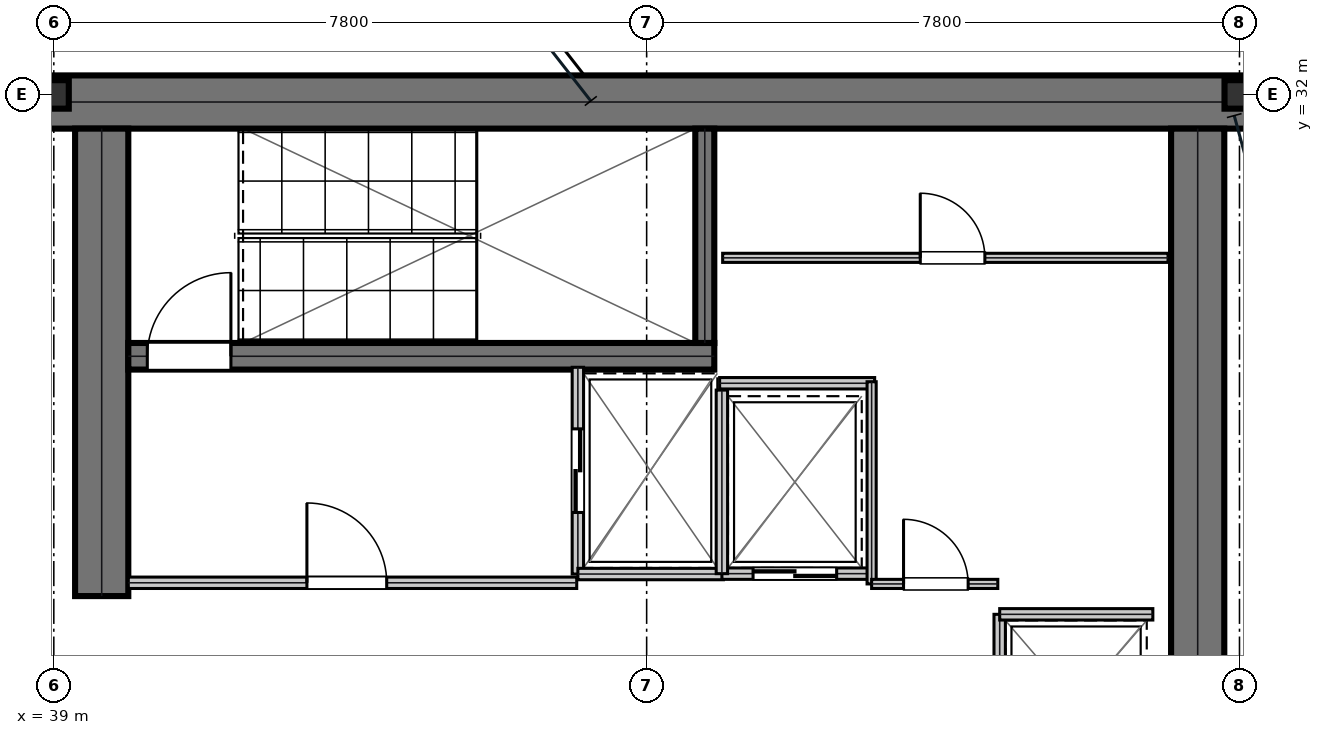
"""IFC4 building model, lengths in metres.
Left out: names, types, materials, properties, quantities, classifications, styles, units other than length and angle.
Written with IfcOpenShell. Run it as: python <this file> out.ifc"""

import sys

from ifc_helpers import new_model, si_unit, direction, frame, frame_2d, origin, origin_2d, place, context, subcontext, project, spatial, rectangle, i_section, extrude, element, fill, save


model = new_model("IFC4")
c1 = context("Model", 3, precision=1e-05, world=origin(), true_north=direction((0.0, 1.0)))
c2 = subcontext(c1, "Body", "Model", "MODEL_VIEW")
j1 = project(units=[si_unit("LENGTHUNIT", "METRE"), si_unit("PLANEANGLEUNIT", "RADIAN")], contexts=[c1])
p1 = place(None, origin())
s1 = spatial("IfcSite", under=j1, at=p1, CompositionType="ELEMENT")
p2 = place(p1, origin())
s2 = spatial("IfcBuilding", under=s1, at=p2, CompositionType="ELEMENT")
p3 = place(p2, frame((0.0, 0.0, 244.5)))
s3 = spatial("IfcBuildingStorey", under=s2, at=p3, CompositionType="ELEMENT", Elevation=244.5)
p4 = place(p3, frame((38.8, 31.9, 0.0), z_axis=(0.0, 0.0, 1.0), x_axis=(1.0, 0.0, 0.0)))
e1 = element("IfcWall", 1, at=p4, inside=s3, PredefinedType="SHEAR", context=c2, shape_type="SweptSolid", body=[
    extrude(rectangle(XDim=16.0, YDim=0.7, at=frame_2d((8.0, 0.0))), origin(), (0.0, 0.0, 1.0), 3.79),
])
p5 = place(p3, frame((39.63, 25.4, 0.0), z_axis=(0.0, 0.0, 1.0), x_axis=(0.0, 1.0, 0.0)))
e2 = element("IfcWall", 2, at=p5, inside=s3, PredefinedType="SHEAR", context=c2, shape_type="SweptSolid", body=[
    extrude(rectangle(XDim=6.15, YDim=0.7, at=frame_2d((3.075, 0.0))), origin(), (0.0, 0.0, 1.0), 3.79),
])
p6 = place(p3, frame((54.05, 16.45, 0.0), z_axis=(0.0, 0.0, 1.0), x_axis=(0.0, 1.0, 0.0)))
e3 = element("IfcWall", 3, at=p6, inside=s3, PredefinedType="SHEAR", context=c2, shape_type="SweptSolid", body=[
    extrude(rectangle(XDim=15.1, YDim=0.7, at=frame_2d((7.55, 0.0))), origin(), (0.0, 0.0, 1.0), 3.79),
])
p7 = place(p3, frame((39.98, 28.555, 0.0), z_axis=(0.0, 0.0, 1.0), x_axis=(1.0, 0.0, 0.0)))
e4 = element("IfcWall", 4, at=p7, inside=s3, PredefinedType="SHEAR", context=c2, shape_type="SweptSolid", body=[
    extrude(rectangle(XDim=7.71, YDim=0.35, at=frame_2d((3.855, 0.0))), origin(), (0.0, 0.0, 1.0), 3.79),
])
p8 = place(p7, frame((0.25, 0.0, 0.0)))
e5 = element("IfcOpeningElement", 5, at=p8, cuts=e4, PredefinedType="OPENING", context=c2, shape_type="SweptSolid", body=[
    extrude(rectangle(XDim=1.1, YDim=2.15, at=frame_2d((0.55, 1.075))), frame((0.0, 0.185, 0.0), z_axis=(0.0, -1.0, 0.0), x_axis=(1.0, 0.0, 0.0)), (0.0, 0.0, 1.0), 0.37),
])
p9 = place(p3, frame((47.565, 28.73, 0.0), z_axis=(0.0, 0.0, 1.0), x_axis=(0.0, 1.0, 0.0)))
e6 = element("IfcWall", 6, at=p9, inside=s3, PredefinedType="SHEAR", context=c2, shape_type="SweptSolid", body=[
    extrude(rectangle(XDim=2.82, YDim=0.25, at=frame_2d((1.41, 0.0))), origin(), (0.0, 0.0, 1.0), 3.79),
])
for number, where, z_axis, x_axis in (
    (7, (39.0, 32.0, 0.0), (0.0, 0.0, 1.0), (1.0, 0.0, 0.0)),
    (8, (54.6, 32.0, 0.0), (0.0, 0.0, 1.0), (1.0, 0.0, 0.0)),
):
    element("IfcColumn", number, at=place(p3, frame(where, z_axis=z_axis, x_axis=x_axis)), inside=s3, PredefinedType="COLUMN", context=c2, shape_type="SweptSolid", body=[
        extrude(i_section(OverallWidth=0.394, OverallDepth=0.375, WebThickness=0.017, FlangeThickness=0.028, at=origin_2d()), origin(), (0.0, 0.0, 1.0), 4.044),
    ])
p10 = place(p3, frame((39.98, 25.575, 0.0), z_axis=(0.0, 0.0, 1.0), x_axis=(1.0, 0.0, 0.0)))
e9 = element("IfcWall", 9, at=p10, inside=s3, PredefinedType="PARTITIONING", context=c2, shape_type="SweptSolid", body=[
    extrude(rectangle(XDim=5.9, YDim=0.15, at=frame_2d((2.95, 0.0))), origin(), (0.0, 0.0, 1.0), 3.79),
])
p11 = place(p10, frame((2.35, 0.0, 0.0)))
e10 = element("IfcOpeningElement", 10, at=p11, cuts=e9, PredefinedType="OPENING", context=c2, shape_type="SweptSolid", body=[
    extrude(rectangle(XDim=1.05, YDim=2.15, at=frame_2d((0.525, 1.075))), frame((0.0, 0.085, 0.0), z_axis=(0.0, -1.0, 0.0), x_axis=(1.0, 0.0, 0.0)), (0.0, 0.0, 1.0), 0.17),
])
p12 = place(p3, frame((45.895, 25.69, 0.0), z_axis=(0.0, 0.0, 1.0), x_axis=(0.0, 1.0, 0.0)))
e11 = element("IfcWall", 11, at=p12, inside=s3, PredefinedType="PARTITIONING", context=c2, shape_type="SweptSolid", body=[
    extrude(rectangle(XDim=2.72, YDim=0.15, at=frame_2d((1.36, 0.0))), origin(), (0.0, 0.0, 1.0), 3.79),
])
p13 = place(p12, frame((0.81, 0.0, 0.0)))
e12 = element("IfcOpeningElement", 12, at=p13, cuts=e11, PredefinedType="OPENING", context=c2, shape_type="SweptSolid", body=[
    extrude(rectangle(XDim=1.1, YDim=2.15, at=frame_2d((0.55, 1.075))), frame((0.0, 0.085, 0.0), z_axis=(0.0, -1.0, 0.0), x_axis=(1.0, 0.0, 0.0)), (0.0, 0.0, 1.0), 0.17),
])
p14 = place(p3, frame((45.895, 25.69, 0.0), z_axis=(0.0, 0.0, 1.0), x_axis=(1.0, 0.0, 0.0)))
e13 = element("IfcWall", 13, at=p14, inside=s3, PredefinedType="PARTITIONING", context=c2, shape_type="SweptSolid", body=[
    extrude(rectangle(XDim=1.915, YDim=0.15, at=frame_2d((0.958, 0.0))), origin(), (0.0, 0.0, 1.0), 3.79),
])
p15 = place(p3, frame((47.79, 25.695, 0.0), z_axis=(0.0, 0.0, 1.0), x_axis=(1.0, 0.0, 0.0)))
e14 = element("IfcWall", 14, at=p15, inside=s3, PredefinedType="PARTITIONING", context=c2, shape_type="SweptSolid", body=[
    extrude(rectangle(XDim=1.92, YDim=0.15, at=frame_2d((0.96, 0.0))), origin(), (0.0, 0.0, 1.0), 3.79),
])
p16 = place(p15, frame((0.41, 0.0, 0.0)))
e15 = element("IfcOpeningElement", 15, at=p16, cuts=e14, PredefinedType="OPENING", context=c2, shape_type="SweptSolid", body=[
    extrude(rectangle(XDim=1.1, YDim=2.15, at=frame_2d((0.55, 1.075))), frame((0.0, 0.085, 0.0), z_axis=(0.0, -1.0, 0.0), x_axis=(1.0, 0.0, 0.0)), (0.0, 0.0, 1.0), 0.17),
])
p17 = place(p3, frame((47.79, 25.695, 0.0), z_axis=(0.0, 0.0, 1.0), x_axis=(0.0, 1.0, 0.0)))
e16 = element("IfcWall", 16, at=p17, inside=s3, PredefinedType="PARTITIONING", context=c2, shape_type="SweptSolid", body=[
    extrude(rectangle(XDim=2.415, YDim=0.15, at=frame_2d((1.208, 0.0))), origin(), (0.0, 0.0, 1.0), 3.79),
])
p18 = place(p3, frame((51.445, 22.84, 0.0), z_axis=(0.0, 0.0, 1.0), x_axis=(0.0, 1.0, 0.0)))
e17 = element("IfcWall", 17, at=p18, inside=s3, PredefinedType="PARTITIONING", context=c2, shape_type="SweptSolid", body=[
    extrude(rectangle(XDim=2.32, YDim=0.15, at=frame_2d((1.16, 0.0))), origin(), (0.0, 0.0, 1.0), 3.79),
])
p19 = place(p18, frame((0.61, 0.0, 0.0)))
e18 = element("IfcOpeningElement", 18, at=p19, cuts=e17, PredefinedType="OPENING", context=c2, shape_type="SweptSolid", body=[
    extrude(rectangle(XDim=1.1, YDim=2.15, at=frame_2d((0.55, 1.075))), frame((0.0, 0.085, 0.0), z_axis=(0.0, -1.0, 0.0), x_axis=(1.0, 0.0, 0.0)), (0.0, 0.0, 1.0), 0.17),
])
p20 = place(p3, frame((51.445, 25.16, 0.0), z_axis=(0.0, 0.0, 1.0), x_axis=(1.0, 0.0, 0.0)))
e19 = element("IfcWall", 19, at=p20, inside=s3, PredefinedType="PARTITIONING", context=c2, shape_type="SweptSolid", body=[
    extrude(rectangle(XDim=2.015, YDim=0.15, at=frame_2d((1.007, 0.0))), origin(), (0.0, 0.0, 1.0), 3.79),
])
p21 = place(p3, frame((47.76, 28.2, 0.0), z_axis=(0.0, 0.0, 1.0), x_axis=(1.0, 0.0, 0.0)))
e20 = element("IfcWall", 20, at=p21, inside=s3, PredefinedType="PARTITIONING", context=c2, shape_type="SweptSolid", body=[
    extrude(rectangle(XDim=2.04, YDim=0.15, at=frame_2d((1.02, 0.0))), origin(), (0.0, 0.0, 1.0), 3.79),
])
p22 = place(p3, frame((49.76, 25.56, 0.0), z_axis=(0.0, 0.0, 1.0), x_axis=(0.0, 1.0, 0.0)))
e21 = element("IfcWall", 21, at=p22, inside=s3, PredefinedType="PARTITIONING", context=c2, shape_type="SweptSolid", body=[
    extrude(rectangle(XDim=2.66, YDim=0.12, at=frame_2d((1.33, 0.0))), origin(), (0.0, 0.0, 1.0), 3.79),
])
p23 = place(p3, frame((49.76, 25.56, 0.0), z_axis=(0.0, 0.0, 1.0), x_axis=(1.0, 0.0, 0.0)))
e22 = element("IfcWall", 22, at=p23, inside=s3, PredefinedType="PARTITIONING", context=c2, shape_type="SweptSolid", body=[
    extrude(rectangle(XDim=1.66, YDim=0.12, at=frame_2d((0.83, 0.0))), origin(), (0.0, 0.0, 1.0), 3.79),
])
p24 = place(p23, frame((0.42, 0.0, 0.0)))
e23 = element("IfcOpeningElement", 23, at=p24, cuts=e22, PredefinedType="OPENING", context=c2, shape_type="SweptSolid", body=[
    extrude(rectangle(XDim=0.85, YDim=2.15, at=frame_2d((0.425, 1.075))), frame((0.0, 0.07, 0.0), z_axis=(0.0, -1.0, 0.0), x_axis=(1.0, 0.0, 0.0)), (0.0, 0.0, 1.0), 0.14),
])
p25 = place(p3, frame((47.8, 29.85, 0.0), z_axis=(0.0, 0.0, 1.0), x_axis=(1.0, 0.0, 0.0)))
e24 = element("IfcWall", 24, at=p25, inside=s3, PredefinedType="PARTITIONING", context=c2, shape_type="SweptSolid", body=[
    extrude(rectangle(XDim=5.86, YDim=0.12, at=frame_2d((2.93, 0.0))), origin(), (0.0, 0.0, 1.0), 3.79),
])
p26 = place(p25, frame((2.6, 0.0, 0.0)))
e25 = element("IfcOpeningElement", 25, at=p26, cuts=e24, PredefinedType="OPENING", context=c2, shape_type="SweptSolid", body=[
    extrude(rectangle(XDim=0.85, YDim=2.15, at=frame_2d((0.425, 1.075))), frame((0.0, 0.07, 0.0), z_axis=(0.0, -1.0, 0.0), x_axis=(1.0, 0.0, 0.0)), (0.0, 0.0, 1.0), 0.14),
])
p27 = place(p11, origin())
e26 = element("IfcDoor", 26, at=p27, inside=s3, OperationType="SINGLE_SWING_LEFT", PredefinedType="DOOR", context=c2, shape_type="SweptSolid", body=[
    extrude(rectangle(XDim=1.05, YDim=2.15, at=frame_2d((0.525, 1.075))), frame((0.0, 0.025, 0.0), z_axis=(0.0, -1.0, 0.0), x_axis=(1.0, 0.0, 0.0)), (0.0, 0.0, 1.0), 0.05),
])
fill(e10, e26)
p28 = place(p13, frame((1.1, 0.0, 0.0), z_axis=(0.0, 0.0, 1.0), x_axis=(-1.0, 0.0, 0.0)))
e27 = element("IfcDoor", 27, at=p28, inside=s3, OperationType="DOUBLE_DOOR_SLIDING", PredefinedType="DOOR", context=c2, shape_type="SweptSolid", body=[
    extrude(rectangle(XDim=1.1, YDim=2.15, at=frame_2d((0.55, 1.075))), frame((0.0, 0.025, 0.0), z_axis=(0.0, -1.0, 0.0), x_axis=(1.0, 0.0, 0.0)), (0.0, 0.0, 1.0), 0.05),
])
fill(e12, e27)
p29 = place(p16, frame((1.1, 0.0, 0.0), z_axis=(0.0, 0.0, 1.0), x_axis=(-1.0, 0.0, 0.0)))
e28 = element("IfcDoor", 28, at=p29, inside=s3, OperationType="DOUBLE_DOOR_SLIDING", PredefinedType="DOOR", context=c2, shape_type="SweptSolid", body=[
    extrude(rectangle(XDim=1.1, YDim=2.15, at=frame_2d((0.55, 1.075))), frame((0.0, 0.025, 0.0), z_axis=(0.0, -1.0, 0.0), x_axis=(1.0, 0.0, 0.0)), (0.0, 0.0, 1.0), 0.05),
])
fill(e15, e28)
p30 = place(p24, origin())
e29 = element("IfcDoor", 29, at=p30, inside=s3, OperationType="SINGLE_SWING_LEFT", PredefinedType="DOOR", context=c2, shape_type="SweptSolid", body=[
    extrude(rectangle(XDim=0.85, YDim=2.15, at=frame_2d((0.425, 1.075))), frame((0.0, 0.025, 0.0), z_axis=(0.0, -1.0, 0.0), x_axis=(1.0, 0.0, 0.0)), (0.0, 0.0, 1.0), 0.05),
])
fill(e23, e29)
p31 = place(p26, origin())
e30 = element("IfcDoor", 30, at=p31, inside=s3, OperationType="SINGLE_SWING_LEFT", PredefinedType="DOOR", context=c2, shape_type="SweptSolid", body=[
    extrude(rectangle(XDim=0.85, YDim=2.15, at=frame_2d((0.425, 1.075))), frame((0.0, 0.025, 0.0), z_axis=(0.0, -1.0, 0.0), x_axis=(1.0, 0.0, 0.0)), (0.0, 0.0, 1.0), 0.05),
])
fill(e25, e30)
p32 = place(p8, origin())
e31 = element("IfcDoor", 31, at=p32, inside=s3, OperationType="SINGLE_SWING_RIGHT", PredefinedType="DOOR", context=c2, shape_type="SweptSolid", body=[
    extrude(rectangle(XDim=1.1, YDim=2.15, at=frame_2d((0.55, 1.075))), frame((0.0, 0.025, 0.0), z_axis=(0.0, -1.0, 0.0), x_axis=(1.0, 0.0, 0.0)), (0.0, 0.0, 1.0), 0.05),
])
fill(e5, e31)
save(model, sys.argv[1])
